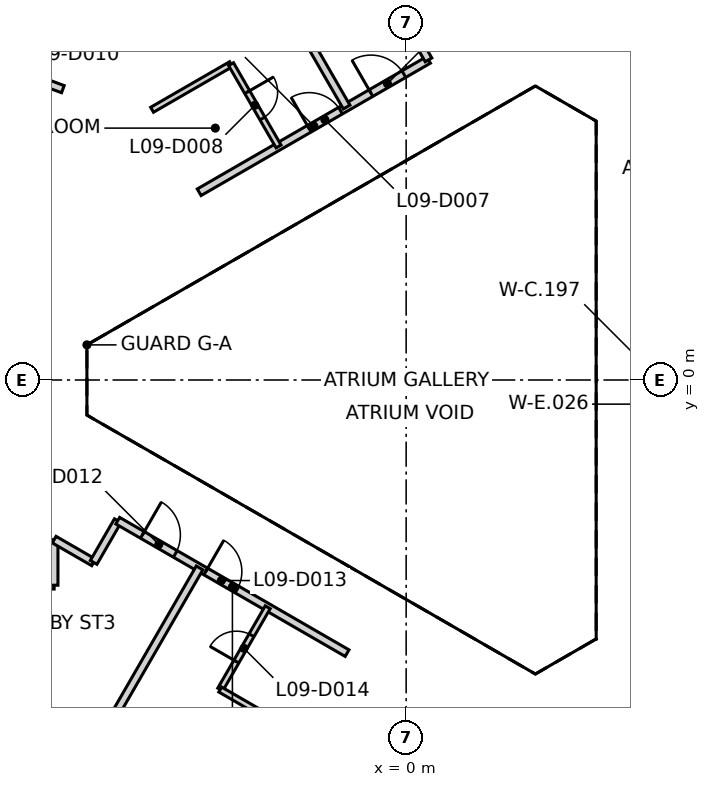
"""IFC4 building model, lengths in metres.
Left out: names, types, materials, properties, quantities, classifications, styles, units other than length and angle.
Written with IfcOpenShell. Run it as: python <this file> out.ifc"""

import sys

from ifc_helpers import new_model, si_unit, direction, frame, frame_2d, origin, place, context, subcontext, project, spatial, rectangle, extrude, element, fill, save


model = new_model("IFC4")
c1 = context("Model", 3, precision=1e-05, world=origin(), true_north=direction((0.0, 1.0)))
c2 = subcontext(c1, "Body", "Model", "MODEL_VIEW")
j1 = project(units=[si_unit("LENGTHUNIT", "METRE"), si_unit("PLANEANGLEUNIT", "RADIAN")], contexts=[c1])
p1 = place(None, origin())
s1 = spatial("IfcSite", under=j1, at=p1, CompositionType="ELEMENT")
p2 = place(p1, origin())
s2 = spatial("IfcBuilding", under=s1, at=p2, CompositionType="ELEMENT")
p3 = place(p2, frame((0.0, 0.0, 45.8)))
s3 = spatial("IfcBuildingStorey", under=s2, at=p3, CompositionType="ELEMENT", Elevation=45.8)
p4 = place(p3, frame((10.42, 6.498, 0.0), z_axis=(0.0, 0.0, 1.0), x_axis=(-0.866021906294, 0.500006057782, 0.0)))
e1 = element("IfcWall", 1, at=p4, inside=s3, PredefinedType="SHEAR", context=c2, shape_type="SweptSolid", body=[
    extrude(rectangle(XDim=11.55, YDim=0.25, at=frame_2d((5.775, 0.0))), origin(), (0.0, 0.0, 1.0), 3.125),
])
p5 = place(p4, frame((10.025, 0.0, 0.0)))
e2 = element("IfcOpeningElement", 2, at=p5, cuts=e1, PredefinedType="OPENING", context=c2, shape_type="SweptSolid", body=[
    extrude(rectangle(XDim=1.2, YDim=2.1, at=frame_2d((0.6, 1.05))), frame((0.0, 0.135, 0.0), z_axis=(0.0, -1.0, 0.0), x_axis=(1.0, 0.0, 0.0)), (0.0, 0.0, 1.0), 0.27),
])
p6 = place(p4, frame((8.725, 0.0, 0.0)))
e3 = element("IfcOpeningElement", 3, at=p6, cuts=e1, PredefinedType="OPENING", context=c2, shape_type="SweptSolid", body=[
    extrude(rectangle(XDim=1.2, YDim=2.1, at=frame_2d((0.6, 1.05))), frame((0.0, 0.135, 0.0), z_axis=(0.0, -1.0, 0.0), x_axis=(1.0, 0.0, 0.0)), (0.0, 0.0, 1.0), 0.27),
])
p7 = place(p3, frame((0.417, -12.273, 0.0), z_axis=(0.0, 0.0, 1.0), x_axis=(0.866021906294, 0.500006057782, 0.0)))
e4 = element("IfcWall", 4, at=p7, inside=s3, PredefinedType="SHEAR", context=c2, shape_type="SweptSolid", body=[
    extrude(rectangle(XDim=11.55, YDim=0.25, at=frame_2d((5.775, 0.0))), origin(), (0.0, 0.0, 1.0), 3.125),
])
p8 = place(p7, frame((10.025, 0.0, 0.0)))
e5 = element("IfcOpeningElement", 5, at=p8, cuts=e4, PredefinedType="OPENING", context=c2, shape_type="SweptSolid", body=[
    extrude(rectangle(XDim=1.2, YDim=2.1, at=frame_2d((0.6, 1.05))), frame((0.0, 0.135, 0.0), z_axis=(0.0, -1.0, 0.0), x_axis=(1.0, 0.0, 0.0)), (0.0, 0.0, 1.0), 0.27),
])
p9 = place(p7, frame((8.725, 0.0, 0.0)))
e6 = element("IfcOpeningElement", 6, at=p9, cuts=e4, PredefinedType="OPENING", context=c2, shape_type="SweptSolid", body=[
    extrude(rectangle(XDim=1.2, YDim=2.1, at=frame_2d((0.6, 1.05))), frame((0.0, 0.135, 0.0), z_axis=(0.0, -1.0, 0.0), x_axis=(1.0, 0.0, 0.0)), (0.0, 0.0, 1.0), 0.27),
])
p10 = place(p3, frame((-16.026, 10.246, 0.0), z_axis=(0.0, 0.0, 1.0), x_axis=(0.937598236139, -0.347720502112, 0.0)))
e7 = element("IfcWall", 7, at=p10, inside=s3, PredefinedType="PARTITIONING", context=c2, shape_type="SweptSolid", body=[
    extrude(rectangle(XDim=7.458, YDim=0.2, at=frame_2d((3.729, 0.0))), origin(), (0.0, 0.0, 1.0), 3.125),
])
p11 = place(p10, frame((3.396, 0.0, 0.0)))
e8 = element("IfcOpeningElement", 8, at=p11, cuts=e7, PredefinedType="OPENING", context=c2, shape_type="SweptSolid", body=[
    extrude(rectangle(XDim=0.95, YDim=2.1, at=frame_2d((0.475, 1.05))), frame((0.0, 0.11, 0.0), z_axis=(0.0, -1.0, 0.0), x_axis=(1.0, 0.0, 0.0)), (0.0, 0.0, 1.0), 0.22),
])
p12 = place(p3, frame((-10.652, -5.4, 0.0), z_axis=(0.0, 0.0, 1.0), x_axis=(1.0, 0.0, 0.0)))
e9 = element("IfcWall", 9, at=p12, inside=s3, PredefinedType="PARTITIONING", context=c2, shape_type="SweptSolid", body=[
    extrude(rectangle(XDim=1.39, YDim=0.2, at=frame_2d((0.695, 0.0))), origin(), (0.0, 0.0, 1.0), 3.125),
])
for number, where, z_axis, x_axis in (
    (10, (-9.262, -5.4, 0.0), (0.0, 0.0, 1.0), (0.0, 1.0, 0.0)),
    (11, (-9.262, -4.2, 0.0), (0.0, 0.0, 1.0), (0.866, -0.5, 0.0)),
):
    element("IfcWall", number, at=place(p3, frame(where, z_axis=z_axis, x_axis=x_axis)), inside=s3, PredefinedType="PARTITIONING", context=c2, shape_type="SweptSolid", body=[
        extrude(rectangle(XDim=1.2, YDim=0.2, at=frame_2d((0.6, 0.0))), origin(), (0.0, 0.0, 1.0), 3.125),
    ])
p13 = place(p3, frame((-8.223, -4.8, 0.0), z_axis=(0.0, 0.0, 1.0), x_axis=(0.499866914522, 0.866102227088, 0.0)))
e12 = element("IfcWall", 12, at=p13, inside=s3, PredefinedType="PARTITIONING", context=c2, shape_type="SweptSolid", body=[
    extrude(rectangle(XDim=1.268, YDim=0.2, at=frame_2d((0.634, 0.0))), origin(), (0.0, 0.0, 1.0), 3.125),
])
p14 = place(p3, frame((-7.589, -3.702, 0.0), z_axis=(0.0, 0.0, 1.0), x_axis=(0.865994210678, -0.500054024153, 0.0)))
e13 = element("IfcWall", 13, at=p14, inside=s3, PredefinedType="PARTITIONING", context=c2, shape_type="SweptSolid", body=[
    extrude(rectangle(XDim=6.969, YDim=0.2, at=frame_2d((3.484, 0.0))), origin(), (0.0, 0.0, 1.0), 3.125),
])
p15 = place(p14, frame((0.749, 0.0, 0.0)))
e14 = element("IfcOpeningElement", 14, at=p15, cuts=e13, PredefinedType="OPENING", context=c2, shape_type="SweptSolid", body=[
    extrude(rectangle(XDim=1.0, YDim=2.1, at=frame_2d((0.5, 1.05))), frame((0.0, 0.11, 0.0), z_axis=(0.0, -1.0, 0.0), x_axis=(1.0, 0.0, 0.0)), (0.0, 0.0, 1.0), 0.22),
])
p16 = place(p14, frame((2.674, 0.0, 0.0)))
e15 = element("IfcOpeningElement", 15, at=p16, cuts=e13, PredefinedType="OPENING", context=c2, shape_type="SweptSolid", body=[
    extrude(rectangle(XDim=0.95, YDim=2.1, at=frame_2d((0.475, 1.05))), frame((0.0, 0.11, 0.0), z_axis=(0.0, -1.0, 0.0), x_axis=(1.0, 0.0, 0.0)), (0.0, 0.0, 1.0), 0.22),
])
p17 = place(p3, frame((-5.446, 4.94, 0.0), z_axis=(0.0, 0.0, 1.0), x_axis=(0.866096332545, 0.499877127655, 0.0)))
e16 = element("IfcWall", 16, at=p17, inside=s3, PredefinedType="PARTITIONING", context=c2, shape_type="SweptSolid", body=[
    extrude(rectangle(XDim=6.969, YDim=0.2, at=frame_2d((3.484, 0.0))), origin(), (0.0, 0.0, 1.0), 3.125),
])
p18 = place(p17, frame((5.219, 0.0, 0.0)))
e17 = element("IfcOpeningElement", 17, at=p18, cuts=e16, PredefinedType="OPENING", context=c2, shape_type="SweptSolid", body=[
    extrude(rectangle(XDim=1.0, YDim=2.1, at=frame_2d((0.5, 1.05))), frame((0.0, 0.11, 0.0), z_axis=(0.0, -1.0, 0.0), x_axis=(1.0, 0.0, 0.0)), (0.0, 0.0, 1.0), 0.22),
])
p19 = place(p17, frame((3.344, 0.0, 0.0)))
e18 = element("IfcOpeningElement", 18, at=p19, cuts=e16, PredefinedType="OPENING", context=c2, shape_type="SweptSolid", body=[
    extrude(rectangle(XDim=0.95, YDim=2.1, at=frame_2d((0.475, 1.05))), frame((0.0, 0.11, 0.0), z_axis=(0.0, -1.0, 0.0), x_axis=(1.0, 0.0, 0.0)), (0.0, 0.0, 1.0), 0.22),
])
p20 = place(p3, frame((-0.045, 9.521, 0.0), z_axis=(0.0, 0.0, 1.0), x_axis=(0.500094716449, -0.865970712311, 0.0)))
e19 = element("IfcWall", 19, at=p20, inside=s3, PredefinedType="PARTITIONING", context=c2, shape_type="SweptSolid", body=[
    extrude(rectangle(XDim=1.268, YDim=0.2, at=frame_2d((0.634, 0.0))), origin(), (0.0, 0.0, 1.0), 3.125),
])
p21 = place(p3, frame((-14.148, -20.035, 0.0), z_axis=(0.0, 0.0, 1.0), x_axis=(0.499978771293, 0.866037659837, 0.0)))
e20 = element("IfcWall", 20, at=p21, inside=s3, PredefinedType="PARTITIONING", context=c2, shape_type="SweptSolid", body=[
    extrude(rectangle(XDim=17.425, YDim=0.2, at=frame_2d((8.712, 0.0))), origin(), (0.0, 0.0, 1.0), 3.125),
])
p22 = place(p3, frame((-10.276, 22.271, 0.0), z_axis=(0.0, 0.0, 1.0), x_axis=(0.499958184216, -0.866049544793, 0.0)))
e21 = element("IfcWall", 21, at=p22, inside=s3, PredefinedType="PARTITIONING", context=c2, shape_type="SweptSolid", body=[
    extrude(rectangle(XDim=17.422, YDim=0.2, at=frame_2d((8.711, 0.0))), origin(), (0.0, 0.0, 1.0), 3.125),
])
p23 = place(p3, frame((-6.686, 7.11, 0.0), z_axis=(0.0, 0.0, 1.0), x_axis=(0.866100915363, 0.499869187296, 0.0)))
e22 = element("IfcWall", 22, at=p23, inside=s3, PredefinedType="PARTITIONING", context=c2, shape_type="SweptSolid", body=[
    extrude(rectangle(XDim=2.401, YDim=0.15, at=frame_2d((1.2, 0.0))), origin(), (0.0, 0.0, 1.0), 3.125),
])
p24 = place(p3, frame((-4.892, -8.145, 0.0), z_axis=(0.0, 0.0, 1.0), x_axis=(0.499711178953, 0.866192090491, 0.0)))
e23 = element("IfcWall", 23, at=p24, inside=s3, PredefinedType="PARTITIONING", context=c2, shape_type="SweptSolid", body=[
    extrude(rectangle(XDim=2.5, YDim=0.15, at=frame_2d((1.25, 0.0))), origin(), (0.0, 0.0, 1.0), 3.125),
])
p25 = place(p24, frame((0.85, 0.0, 0.0)))
e24 = element("IfcOpeningElement", 24, at=p25, cuts=e23, PredefinedType="OPENING", context=c2, shape_type="SweptSolid", body=[
    extrude(rectangle(XDim=0.8, YDim=2.1, at=frame_2d((0.4, 1.05))), frame((0.0, 0.085, 0.0), z_axis=(0.0, -1.0, 0.0), x_axis=(1.0, 0.0, 0.0)), (0.0, 0.0, 1.0), 0.17),
])
p26 = place(p3, frame((-4.892, -8.145, 0.0), z_axis=(0.0, 0.0, 1.0), x_axis=(0.865999212041, -0.500045362686, 0.0)))
e25 = element("IfcWall", 25, at=p26, inside=s3, PredefinedType="PARTITIONING", context=c2, shape_type="SweptSolid", body=[
    extrude(rectangle(XDim=2.4, YDim=0.15, at=frame_2d((1.2, 0.0))), origin(), (0.0, 0.0, 1.0), 3.125),
])
p27 = place(p3, frame((-4.607, 8.31, 0.0), z_axis=(0.0, 0.0, 1.0), x_axis=(0.500004234368, -0.866022959057, 0.0)))
e26 = element("IfcWall", 26, at=p27, inside=s3, PredefinedType="PARTITIONING", context=c2, shape_type="SweptSolid", body=[
    extrude(rectangle(XDim=2.5, YDim=0.15, at=frame_2d((1.25, 0.0))), origin(), (0.0, 0.0, 1.0), 3.125),
])
p28 = place(p27, frame((0.85, 0.0, 0.0)))
e27 = element("IfcOpeningElement", 27, at=p28, cuts=e26, PredefinedType="OPENING", context=c2, shape_type="SweptSolid", body=[
    extrude(rectangle(XDim=0.8, YDim=2.1, at=frame_2d((0.4, 1.05))), frame((0.0, 0.085, 0.0), z_axis=(0.0, -1.0, 0.0), x_axis=(1.0, 0.0, 0.0)), (0.0, 0.0, 1.0), 0.17),
])
p29 = place(p18, origin())
e28 = element("IfcDoor", 28, at=p29, inside=s3, OperationType="SINGLE_SWING_LEFT", PredefinedType="DOOR", context=c2, shape_type="SweptSolid", body=[
    extrude(rectangle(XDim=1.0, YDim=2.1, at=frame_2d((0.5, 1.05))), frame((0.0, 0.025, 0.0), z_axis=(0.0, -1.0, 0.0), x_axis=(1.0, 0.0, 0.0)), (0.0, 0.0, 1.0), 0.05),
])
fill(e17, e28)
p30 = place(p19, origin())
e29 = element("IfcDoor", 29, at=p30, inside=s3, OperationType="SINGLE_SWING_LEFT", PredefinedType="DOOR", context=c2, shape_type="SweptSolid", body=[
    extrude(rectangle(XDim=0.95, YDim=2.1, at=frame_2d((0.475, 1.05))), frame((0.0, 0.025, 0.0), z_axis=(0.0, -1.0, 0.0), x_axis=(1.0, 0.0, 0.0)), (0.0, 0.0, 1.0), 0.05),
])
fill(e18, e29)
p31 = place(p28, frame((0.8, 0.0, 0.0), z_axis=(0.0, 0.0, 1.0), x_axis=(-1.0, 0.0, 0.0)))
e30 = element("IfcDoor", 30, at=p31, inside=s3, OperationType="SINGLE_SWING_LEFT", PredefinedType="DOOR", context=c2, shape_type="SweptSolid", body=[
    extrude(rectangle(XDim=0.8, YDim=2.1, at=frame_2d((0.4, 1.05))), frame((0.0, 0.025, 0.0), z_axis=(0.0, -1.0, 0.0), x_axis=(1.0, 0.0, 0.0)), (0.0, 0.0, 1.0), 0.05),
])
fill(e27, e30)
p32 = place(p15, frame((1.0, 0.0, 0.0), z_axis=(0.0, 0.0, 1.0), x_axis=(-1.0, 0.0, 0.0)))
e31 = element("IfcDoor", 31, at=p32, inside=s3, OperationType="SINGLE_SWING_LEFT", PredefinedType="DOOR", context=c2, shape_type="SweptSolid", body=[
    extrude(rectangle(XDim=1.0, YDim=2.1, at=frame_2d((0.5, 1.05))), frame((0.0, 0.025, 0.0), z_axis=(0.0, -1.0, 0.0), x_axis=(1.0, 0.0, 0.0)), (0.0, 0.0, 1.0), 0.05),
])
fill(e14, e31)
p33 = place(p16, frame((0.95, 0.0, 0.0), z_axis=(0.0, 0.0, 1.0), x_axis=(-1.0, 0.0, 0.0)))
e32 = element("IfcDoor", 32, at=p33, inside=s3, OperationType="SINGLE_SWING_LEFT", PredefinedType="DOOR", context=c2, shape_type="SweptSolid", body=[
    extrude(rectangle(XDim=0.95, YDim=2.1, at=frame_2d((0.475, 1.05))), frame((0.0, 0.025, 0.0), z_axis=(0.0, -1.0, 0.0), x_axis=(1.0, 0.0, 0.0)), (0.0, 0.0, 1.0), 0.05),
])
fill(e15, e32)
p34 = place(p25, frame((0.8, 0.0, 0.0), z_axis=(0.0, 0.0, 1.0), x_axis=(-1.0, 0.0, 0.0)))
e33 = element("IfcDoor", 33, at=p34, inside=s3, OperationType="SINGLE_SWING_LEFT", PredefinedType="DOOR", context=c2, shape_type="SweptSolid", body=[
    extrude(rectangle(XDim=0.8, YDim=2.1, at=frame_2d((0.4, 1.05))), frame((0.0, 0.025, 0.0), z_axis=(0.0, -1.0, 0.0), x_axis=(1.0, 0.0, 0.0)), (0.0, 0.0, 1.0), 0.05),
])
fill(e24, e33)
save(model, sys.argv[1])
